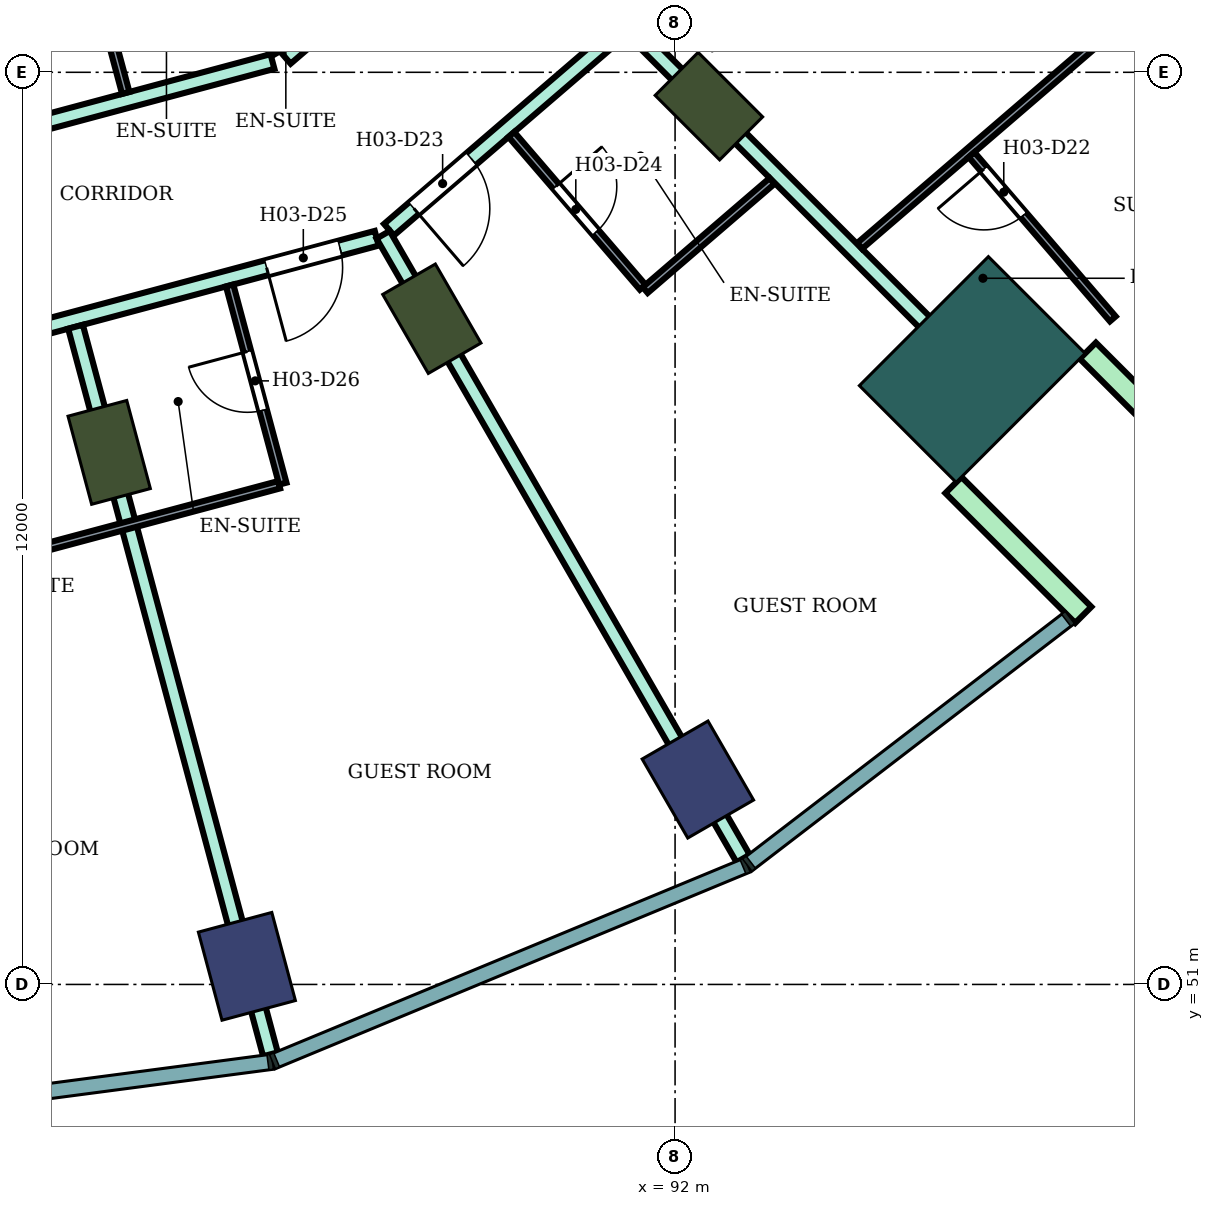
"""IFC4 building model, lengths in metres.
Left out: names, types, materials, properties, quantities, classifications, styles, units other than length and angle.
Written with IfcOpenShell. Run it as: python <this file> out.ifc"""

import sys

from ifc_helpers import new_model, si_unit, direction, frame, frame_2d, origin, origin_2d, place, context, subcontext, project, spatial, rectangle, extrude, element, fill, save


model = new_model("IFC4")
c1 = context("Model", 3, precision=1e-05, world=origin(), true_north=direction((0.0, 1.0)))
c2 = subcontext(c1, "Body", "Model", "MODEL_VIEW")
j1 = project(units=[si_unit("LENGTHUNIT", "METRE"), si_unit("PLANEANGLEUNIT", "RADIAN")], contexts=[c1])
p1 = place(None, origin())
s1 = spatial("IfcSite", under=j1, at=p1, CompositionType="ELEMENT")
p2 = place(p1, origin())
s2 = spatial("IfcBuilding", under=s1, at=p2, CompositionType="ELEMENT")
p3 = place(p2, frame((0.0, 0.0, 55.4)))
s3 = spatial("IfcBuildingStorey", under=s2, at=p3, CompositionType="ELEMENT", Elevation=55.4)
for number, where, z_axis, x_axis in (
    (1, (86.367, 51.238, 0.0), (0.0, 0.0, 1.0), (0.259, -0.966, 0.0)),
    (2, (92.3, 53.696, 0.0), (0.0, 0.0, 1.0), (0.5, -0.866, 0.0)),
):
    element("IfcColumn", number, at=place(p3, frame(where, z_axis=z_axis, x_axis=x_axis)), inside=s3, PredefinedType="COLUMN", context=c2, shape_type="SweptSolid", body=[
        extrude(rectangle(XDim=1.2, YDim=1.0, at=origin_2d()), origin(), (0.0, 0.0, 1.0), 3.8),
    ])
for number, where, z_axis, x_axis in (
    (3, (84.555, 58.0, 0.0), (0.0, 0.0, 1.0), (0.259, -0.966, 0.0)),
    (4, (88.8, 59.758, 0.0), (0.0, 0.0, 1.0), (0.5, -0.866, 0.0)),
    (5, (92.445, 62.555, 0.0), (0.0, 0.0, 1.0), (0.707, -0.707, 0.0)),
):
    element("IfcColumn", number, at=place(p3, frame(where, z_axis=z_axis, x_axis=x_axis)), inside=s3, PredefinedType="COLUMN", context=c2, shape_type="SweptSolid", body=[
        extrude(rectangle(XDim=1.2, YDim=0.8, at=origin_2d()), origin(), (0.0, 0.0, 1.0), 3.8),
    ])
p4 = place(p3, frame((95.91, 59.09, 0.0), z_axis=(0.0, 0.0, 1.0), x_axis=(0.707106781187, -0.707106781187, 0.0)))
e6 = element("IfcColumn", 6, at=p4, inside=s3, PredefinedType="COLUMN", context=c2, shape_type="SweptSolid", body=[
    extrude(rectangle(XDim=1.8, YDim=2.4, at=origin_2d()), origin(), (0.0, 0.0, 1.0), 3.8),
])
for number, where, z_axis, x_axis in (
    (7, (95.662, 57.57, 0.0), (0.0, 0.0, 1.0), (0.707, -0.707, 0.0)),
    (8, (97.43, 59.338, 0.0), (0.0, 0.0, 1.0), (0.707, -0.707, 0.0)),
):
    element("IfcWall", number, at=place(p3, frame(where, z_axis=z_axis, x_axis=x_axis)), inside=s3, PredefinedType="NOTDEFINED", context=c2, shape_type="SweptSolid", body=[
        extrude(rectangle(XDim=2.416, YDim=0.3, at=frame_2d((1.208, 0.0))), origin(), (0.0, 0.0, 1.0), 3.8),
    ])
p5 = place(p3, frame((80.0, 58.655, 0.0), z_axis=(0.0, 0.0, 1.0), x_axis=(0.965974635626, 0.258636817424, 0.0)))
e9 = element("IfcWall", 9, at=p5, inside=s3, PredefinedType="PARTITIONING", context=c2, shape_type="SweptSolid", body=[
    extrude(rectangle(XDim=8.36, YDim=0.2, at=frame_2d((4.18, 0.0))), origin(), (0.0, 0.0, 1.0), 3.35),
])
p6 = place(p5, frame((6.86, 0.0, 0.0)))
e10 = element("IfcOpeningElement", 10, at=p6, cuts=e9, PredefinedType="OPENING", context=c2, shape_type="SweptSolid", body=[
    extrude(rectangle(XDim=1.0, YDim=2.1, at=frame_2d((0.5, 1.05))), frame((0.0, 0.11, 0.0), z_axis=(0.0, -1.0, 0.0), x_axis=(1.0, 0.0, 0.0)), (0.0, 0.0, 1.0), 0.22),
])
p7 = place(p5, frame((0.55, 0.0, 0.0)))
e11 = element("IfcOpeningElement", 11, at=p7, cuts=e9, PredefinedType="OPENING", context=c2, shape_type="SweptSolid", body=[
    extrude(rectangle(XDim=1.0, YDim=2.1, at=frame_2d((0.5, 1.05))), frame((0.0, 0.11, 0.0), z_axis=(0.0, -1.0, 0.0), x_axis=(1.0, 0.0, 0.0)), (0.0, 0.0, 1.0), 0.22),
])
p8 = place(p3, frame((80.0, 61.346, 0.0), z_axis=(0.0, 0.0, 1.0), x_axis=(0.965924181808, 0.258825182312, 0.0)))
e12 = element("IfcWall", 12, at=p8, inside=s3, PredefinedType="PARTITIONING", context=c2, shape_type="SweptSolid", body=[
    extrude(rectangle(XDim=6.94, YDim=0.2, at=frame_2d((3.47, 0.0))), origin(), (0.0, 0.0, 1.0), 3.35),
])
p9 = place(p8, frame((0.55, 0.0, 0.0)))
e13 = element("IfcOpeningElement", 13, at=p9, cuts=e12, PredefinedType="OPENING", context=c2, shape_type="SweptSolid", body=[
    extrude(rectangle(XDim=1.0, YDim=2.1, at=frame_2d((0.5, 1.05))), frame((0.0, 0.11, 0.0), z_axis=(0.0, -1.0, 0.0), x_axis=(1.0, 0.0, 0.0)), (0.0, 0.0, 1.0), 0.22),
])
p10 = place(p3, frame((83.848, 68.332, 0.0), z_axis=(0.0, 0.0, 1.0), x_axis=(0.499901724708, -0.866082135617, 0.0)))
e14 = element("IfcWall", 14, at=p10, inside=s3, PredefinedType="PARTITIONING", context=c2, shape_type="SweptSolid", body=[
    extrude(rectangle(XDim=5.855, YDim=0.2, at=frame_2d((2.928, 0.0))), origin(), (0.0, 0.0, 1.0), 3.35),
])
p11 = place(p3, frame((84.112, 59.652, 0.0), z_axis=(0.0, 0.0, 1.0), x_axis=(0.258843225553, -0.965919346832, 0.0)))
e15 = element("IfcWall", 15, at=p11, inside=s3, PredefinedType="PARTITIONING", context=c2, shape_type="SweptSolid", body=[
    extrude(rectangle(XDim=9.909, YDim=0.2, at=frame_2d((4.955, 0.0))), origin(), (0.0, 0.0, 1.0), 3.35),
])
p12 = place(p3, frame((86.877, 63.189, 0.0), z_axis=(0.0, 0.0, 1.0), x_axis=(0.758164888471, 0.652062881853, 0.0)))
e16 = element("IfcWall", 16, at=p12, inside=s3, PredefinedType="PARTITIONING", context=c2, shape_type="SweptSolid", body=[
    extrude(rectangle(XDim=5.23, YDim=0.2, at=frame_2d((2.615, 0.0))), origin(), (0.0, 0.0, 1.0), 3.35),
])
p13 = place(p12, frame((2.63, 0.0, 0.0)))
e17 = element("IfcOpeningElement", 17, at=p13, cuts=e16, PredefinedType="OPENING", context=c2, shape_type="SweptSolid", body=[
    extrude(rectangle(XDim=1.0, YDim=2.1, at=frame_2d((0.5, 1.05))), frame((0.0, 0.11, 0.0), z_axis=(0.0, -1.0, 0.0), x_axis=(1.0, 0.0, 0.0)), (0.0, 0.0, 1.0), 0.22),
])
p14 = place(p3, frame((88.236, 60.929, 0.0), z_axis=(0.0, 0.0, 1.0), x_axis=(0.758227485202, 0.651990092474, 0.0)))
e18 = element("IfcWall", 18, at=p14, inside=s3, PredefinedType="PARTITIONING", context=c2, shape_type="SweptSolid", body=[
    extrude(rectangle(XDim=6.336, YDim=0.2, at=frame_2d((3.168, 0.0))), origin(), (0.0, 0.0, 1.0), 3.35),
])
p15 = place(p14, frame((4.757, 0.0, 0.0)))
e19 = element("IfcOpeningElement", 19, at=p15, cuts=e18, PredefinedType="OPENING", context=c2, shape_type="SweptSolid", body=[
    extrude(rectangle(XDim=1.0, YDim=2.1, at=frame_2d((0.5, 1.05))), frame((0.0, 0.11, 0.0), z_axis=(0.0, -1.0, 0.0), x_axis=(1.0, 0.0, 0.0)), (0.0, 0.0, 1.0), 0.22),
])
p16 = place(p14, frame((0.43, 0.0, 0.0)))
e20 = element("IfcOpeningElement", 20, at=p16, cuts=e18, PredefinedType="OPENING", context=c2, shape_type="SweptSolid", body=[
    extrude(rectangle(XDim=1.0, YDim=2.1, at=frame_2d((0.5, 1.05))), frame((0.0, 0.11, 0.0), z_axis=(0.0, -1.0, 0.0), x_axis=(1.0, 0.0, 0.0)), (0.0, 0.0, 1.0), 0.22),
])
p17 = place(p3, frame((88.159, 60.863, 0.0), z_axis=(0.0, 0.0, 1.0), x_axis=(0.499886028459, -0.866091195286, 0.0)))
e21 = element("IfcWall", 21, at=p17, inside=s3, PredefinedType="PARTITIONING", context=c2, shape_type="SweptSolid", body=[
    extrude(rectangle(XDim=9.475, YDim=0.2, at=frame_2d((4.737, 0.0))), origin(), (0.0, 0.0, 1.0), 3.35),
])
p18 = place(p3, frame((91.449, 63.548, 0.0), z_axis=(0.0, 0.0, 1.0), x_axis=(0.706984810649, -0.707228730688, 0.0)))
e22 = element("IfcWall", 22, at=p18, inside=s3, PredefinedType="PARTITIONING", context=c2, shape_type="SweptSolid", body=[
    extrude(rectangle(XDim=7.006, YDim=0.2, at=frame_2d((3.503, 0.0))), origin(), (0.0, 0.0, 1.0), 3.35),
])
p19 = place(p3, frame((82.782, 56.501, 0.0), z_axis=(0.0, 0.0, 1.0), x_axis=(0.965999228418, 0.258544949083, 0.0)))
e23 = element("IfcWall", 23, at=p19, inside=s3, PredefinedType="PARTITIONING", context=c2, shape_type="SweptSolid", body=[
    extrude(rectangle(XDim=4.15, YDim=0.1, at=frame_2d((2.075, 0.0))), origin(), (0.0, 0.0, 1.0), 3.35),
])
p20 = place(p3, frame((84.087, 65.289, 0.0), z_axis=(0.0, 0.0, 1.0), x_axis=(0.258929459649, -0.965896234037, 0.0)))
e24 = element("IfcWall", 24, at=p20, inside=s3, PredefinedType="PARTITIONING", context=c2, shape_type="SweptSolid", body=[
    extrude(rectangle(XDim=2.65, YDim=0.1, at=frame_2d((1.325, 0.0))), origin(), (0.0, 0.0, 1.0), 3.35),
])
p21 = place(p20, frame((0.95, 0.0, 0.0)))
e25 = element("IfcOpeningElement", 25, at=p21, cuts=e24, PredefinedType="OPENING", context=c2, shape_type="SweptSolid", body=[
    extrude(rectangle(XDim=0.8, YDim=2.1, at=frame_2d((0.4, 1.05))), frame((0.0, 0.06, 0.0), z_axis=(0.0, -1.0, 0.0), x_axis=(1.0, 0.0, 0.0)), (0.0, 0.0, 1.0), 0.12),
])
p22 = place(p3, frame((86.14, 60.196, 0.0), z_axis=(0.0, 0.0, 1.0), x_axis=(0.258945475746, -0.965891940432, 0.0)))
e26 = element("IfcWall", 26, at=p22, inside=s3, PredefinedType="PARTITIONING", context=c2, shape_type="SweptSolid", body=[
    extrude(rectangle(XDim=2.7, YDim=0.1, at=frame_2d((1.35, 0.0))), origin(), (0.0, 0.0, 1.0), 3.35),
])
p23 = place(p22, frame((0.9, 0.0, 0.0)))
e27 = element("IfcOpeningElement", 27, at=p23, cuts=e26, PredefinedType="OPENING", context=c2, shape_type="SweptSolid", body=[
    extrude(rectangle(XDim=0.8, YDim=2.1, at=frame_2d((0.4, 1.05))), frame((0.0, 0.06, 0.0), z_axis=(0.0, -1.0, 0.0), x_axis=(1.0, 0.0, 0.0)), (0.0, 0.0, 1.0), 0.12),
])
p24 = place(p3, frame((89.846, 62.182, 0.0), z_axis=(0.0, 0.0, 1.0), x_axis=(0.652095405055, -0.758136915541, 0.0)))
e28 = element("IfcWall", 28, at=p24, inside=s3, PredefinedType="PARTITIONING", context=c2, shape_type="SweptSolid", body=[
    extrude(rectangle(XDim=2.65, YDim=0.1, at=frame_2d((1.325, 0.0))), origin(), (0.0, 0.0, 1.0), 3.35),
])
p25 = place(p24, frame((0.9, 0.0, 0.0)))
e29 = element("IfcOpeningElement", 29, at=p25, cuts=e28, PredefinedType="OPENING", context=c2, shape_type="SweptSolid", body=[
    extrude(rectangle(XDim=0.8, YDim=2.1, at=frame_2d((0.4, 1.05))), frame((0.0, 0.06, 0.0), z_axis=(0.0, -1.0, 0.0), x_axis=(1.0, 0.0, 0.0)), (0.0, 0.0, 1.0), 0.12),
])
p26 = place(p3, frame((91.607, 60.135, 0.0), z_axis=(0.0, 0.0, 1.0), x_axis=(0.758135842672, 0.652096652388, 0.0)))
e30 = element("IfcWall", 30, at=p26, inside=s3, PredefinedType="PARTITIONING", context=c2, shape_type="SweptSolid", body=[
    extrude(rectangle(XDim=2.201, YDim=0.1, at=frame_2d((1.101, 0.0))), origin(), (0.0, 0.0, 1.0), 3.35),
])
p27 = place(p3, frame((94.428, 60.715, 0.0), z_axis=(0.0, 0.0, 1.0), x_axis=(0.758117248367, 0.65211826974, 0.0)))
e31 = element("IfcWall", 31, at=p27, inside=s3, PredefinedType="PARTITIONING", context=c2, shape_type="SweptSolid", body=[
    extrude(rectangle(XDim=9.024, YDim=0.1, at=frame_2d((4.512, 0.0))), origin(), (0.0, 0.0, 1.0), 3.35),
])
p28 = place(p27, frame((5.002, 0.0, 0.0)))
e32 = element("IfcOpeningElement", 32, at=p28, cuts=e31, PredefinedType="OPENING", context=c2, shape_type="SweptSolid", body=[
    extrude(rectangle(XDim=0.9, YDim=2.1, at=frame_2d((0.45, 1.05))), frame((0.0, 0.06, 0.0), z_axis=(0.0, -1.0, 0.0), x_axis=(1.0, 0.0, 0.0)), (0.0, 0.0, 1.0), 0.12),
])
p29 = place(p3, frame((95.901, 61.916, 0.0), z_axis=(0.0, 0.0, 1.0), x_axis=(0.652215581117, -0.758033532074, 0.0)))
e33 = element("IfcWall", 33, at=p29, inside=s3, PredefinedType="PARTITIONING", context=c2, shape_type="SweptSolid", body=[
    extrude(rectangle(XDim=2.849, YDim=0.1, at=frame_2d((1.425, 0.0))), origin(), (0.0, 0.0, 1.0), 3.35),
])
p30 = place(p29, frame((0.25, 0.0, 0.0)))
e34 = element("IfcOpeningElement", 34, at=p30, cuts=e33, PredefinedType="OPENING", context=c2, shape_type="SweptSolid", body=[
    extrude(rectangle(XDim=0.8, YDim=2.1, at=frame_2d((0.4, 1.05))), frame((0.0, 0.06, 0.0), z_axis=(0.0, -1.0, 0.0), x_axis=(1.0, 0.0, 0.0)), (0.0, 0.0, 1.0), 0.12),
])
p31 = place(p30, frame((0.8, 0.0, 0.0), z_axis=(0.0, 0.0, 1.0), x_axis=(-1.0, 0.0, 0.0)))
e35 = element("IfcDoor", 35, at=p31, inside=s3, OperationType="SINGLE_SWING_RIGHT", PredefinedType="DOOR", context=c2, shape_type="SweptSolid", body=[
    extrude(rectangle(XDim=0.8, YDim=2.1, at=frame_2d((0.4, 1.05))), frame((0.0, 0.025, 0.0), z_axis=(0.0, -1.0, 0.0), x_axis=(1.0, 0.0, 0.0)), (0.0, 0.0, 1.0), 0.05),
])
fill(e34, e35)
p32 = place(p16, frame((1.0, 0.0, 0.0), z_axis=(0.0, 0.0, 1.0), x_axis=(-1.0, 0.0, 0.0)))
e36 = element("IfcDoor", 36, at=p32, inside=s3, OperationType="SINGLE_SWING_RIGHT", PredefinedType="DOOR", context=c2, shape_type="SweptSolid", body=[
    extrude(rectangle(XDim=1.0, YDim=2.1, at=frame_2d((0.5, 1.05))), frame((0.0, 0.025, 0.0), z_axis=(0.0, -1.0, 0.0), x_axis=(1.0, 0.0, 0.0)), (0.0, 0.0, 1.0), 0.05),
])
fill(e20, e36)
p33 = place(p25, origin())
e37 = element("IfcDoor", 37, at=p33, inside=s3, OperationType="SINGLE_SWING_LEFT", PredefinedType="DOOR", context=c2, shape_type="SweptSolid", body=[
    extrude(rectangle(XDim=0.8, YDim=2.1, at=frame_2d((0.4, 1.05))), frame((0.0, 0.025, 0.0), z_axis=(0.0, -1.0, 0.0), x_axis=(1.0, 0.0, 0.0)), (0.0, 0.0, 1.0), 0.05),
])
fill(e29, e37)
p34 = place(p6, frame((1.0, 0.0, 0.0), z_axis=(0.0, 0.0, 1.0), x_axis=(-1.0, 0.0, 0.0)))
e38 = element("IfcDoor", 38, at=p34, inside=s3, OperationType="SINGLE_SWING_RIGHT", PredefinedType="DOOR", context=c2, shape_type="SweptSolid", body=[
    extrude(rectangle(XDim=1.0, YDim=2.1, at=frame_2d((0.5, 1.05))), frame((0.0, 0.025, 0.0), z_axis=(0.0, -1.0, 0.0), x_axis=(1.0, 0.0, 0.0)), (0.0, 0.0, 1.0), 0.05),
])
fill(e10, e38)
p35 = place(p23, frame((0.8, 0.0, 0.0), z_axis=(0.0, 0.0, 1.0), x_axis=(-1.0, 0.0, 0.0)))
e39 = element("IfcDoor", 39, at=p35, inside=s3, OperationType="SINGLE_SWING_RIGHT", PredefinedType="DOOR", context=c2, shape_type="SweptSolid", body=[
    extrude(rectangle(XDim=0.8, YDim=2.1, at=frame_2d((0.4, 1.05))), frame((0.0, 0.025, 0.0), z_axis=(0.0, -1.0, 0.0), x_axis=(1.0, 0.0, 0.0)), (0.0, 0.0, 1.0), 0.05),
])
fill(e27, e39)
save(model, sys.argv[1])
